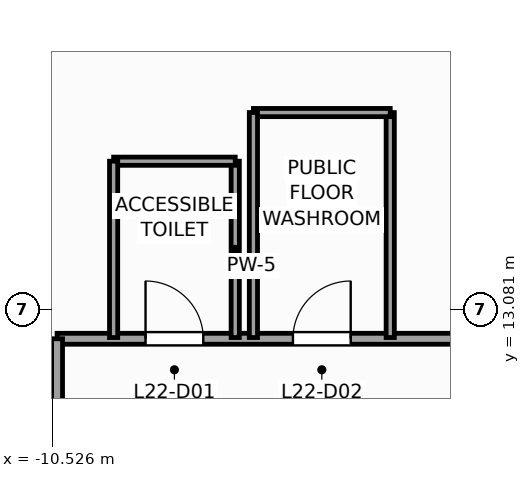
"""IFC4 building model, lengths in metres.
Left out: names, types, materials, properties, quantities, classifications, styles, units other than length and angle.
Written with IfcOpenShell. Run it as: python <this file> out.ifc"""

import sys

from ifc_helpers import new_model, si_unit, direction, frame, frame_2d, origin, place, context, subcontext, project, spatial, rectangle, extrude, source, transform, mapped, element, fill, save


model = new_model("IFC4")
c1 = context("Model", 3, precision=1e-05, world=origin(), true_north=direction((0.0, 1.0)))
c2 = subcontext(c1, "Body", "Model", "MODEL_VIEW")
j1 = project(units=[si_unit("LENGTHUNIT", "METRE"), si_unit("PLANEANGLEUNIT", "RADIAN")], contexts=[c1])
p1 = place(None, origin())
s1 = spatial("IfcSite", under=j1, at=p1, CompositionType="ELEMENT")
p2 = place(p1, origin())
s2 = spatial("IfcBuilding", under=s1, at=p2, CompositionType="ELEMENT")
p3 = place(p2, frame((0.0, 0.0, 95.2)))
s3 = spatial("IfcBuildingStorey", under=s2, at=p3, CompositionType="ELEMENT", Elevation=95.2)
p4 = place(p3, frame((-10.45, 12.6, 0.0), z_axis=(0.0, 0.0, 1.0), x_axis=(1.0, 0.0, 0.0)))
e1 = element("IfcWall", 1, at=p4, inside=s3, PredefinedType="PARTITIONING", context=c2, shape_type="SweptSolid", body=[
    extrude(rectangle(XDim=23.05, YDim=0.18, at=frame_2d((11.525, 0.0))), origin(), (0.0, 0.0, 1.0), 3.74),
])
p5 = place(p4, frame((1.455, 0.0, 0.0)))
e2 = element("IfcOpeningElement", 2, at=p5, cuts=e1, PredefinedType="OPENING", context=c2, shape_type="SweptSolid", body=[
    extrude(rectangle(XDim=0.95, YDim=2.1, at=frame_2d((0.475, 1.05))), frame((0.0, 0.1, 0.0), z_axis=(0.0, -1.0, 0.0), x_axis=(1.0, 0.0, 0.0)), (0.0, 0.0, 1.0), 0.2),
])
p6 = place(p4, frame((3.879, 0.0, 0.0)))
e3 = element("IfcOpeningElement", 3, at=p6, cuts=e1, PredefinedType="OPENING", context=c2, shape_type="SweptSolid", body=[
    extrude(rectangle(XDim=0.95, YDim=2.1, at=frame_2d((0.475, 1.05))), frame((0.0, 0.1, 0.0), z_axis=(0.0, -1.0, 0.0), x_axis=(1.0, 0.0, 0.0)), (0.0, 0.0, 1.0), 0.2),
])
p7 = place(p4, frame((14.436, 0.0, 0.0)))
e4 = element("IfcOpeningElement", 4, at=p7, cuts=e1, PredefinedType="OPENING", context=c2, shape_type="SweptSolid", body=[
    extrude(rectangle(XDim=1.1, YDim=2.2, at=frame_2d((0.55, 1.1))), frame((0.0, 0.1, 0.0), z_axis=(0.0, -1.0, 0.0), x_axis=(1.0, 0.0, 0.0)), (0.0, 0.0, 1.0), 0.2),
])
p8 = place(p3, frame((-10.45, -1.05, 0.0), z_axis=(0.0, 0.0, 1.0), x_axis=(0.0, 1.0, 0.0)))
e5 = element("IfcWall", 5, at=p8, inside=s3, PredefinedType="PARTITIONING", context=c2, shape_type="SweptSolid", body=[
    extrude(rectangle(XDim=13.65, YDim=0.18, at=frame_2d((6.825, 0.0))), origin(), (0.0, 0.0, 1.0), 3.74),
])
p9 = place(p3, frame((-7.52, 12.62, 0.0), z_axis=(0.0, 0.0, 1.0), x_axis=(0.0, 1.0, 0.0)))
e6 = element("IfcWall", 6, at=p9, inside=s3, PredefinedType="PARTITIONING", context=c2, shape_type="SweptSolid", body=[
    extrude(rectangle(XDim=2.9, YDim=0.135, at=frame_2d((1.45, 0.0))), origin(), (0.0, 0.0, 1.0), 3.41),
])
p10 = place(p3, frame((-9.52, 15.52, 0.0), z_axis=(0.0, 0.0, 1.0), x_axis=(1.0, 0.0, 0.0)))
e7 = element("IfcWall", 7, at=p10, inside=s3, PredefinedType="PARTITIONING", context=c2, shape_type="SweptSolid", body=[
    extrude(rectangle(XDim=2.0, YDim=0.135, at=frame_2d((1.0, 0.0))), origin(), (0.0, 0.0, 1.0), 3.74),
])
p11 = place(p3, frame((-9.52, 12.62, 0.0), z_axis=(0.0, 0.0, 1.0), x_axis=(0.0, 1.0, 0.0)))
e8 = element("IfcWall", 8, at=p11, inside=s3, PredefinedType="PARTITIONING", context=c2, shape_type="SweptSolid", body=[
    extrude(rectangle(XDim=2.9, YDim=0.135, at=frame_2d((1.45, 0.0))), origin(), (0.0, 0.0, 1.0), 3.74),
])
p12 = place(p3, frame((-4.971, 12.62, 0.0), z_axis=(0.0, 0.0, 1.0), x_axis=(0.0, 1.0, 0.0)))
e9 = element("IfcWall", 9, at=p12, inside=s3, PredefinedType="PARTITIONING", context=c2, shape_type="SweptSolid", body=[
    extrude(rectangle(XDim=3.7, YDim=0.135, at=frame_2d((1.85, 0.0))), origin(), (0.0, 0.0, 1.0), 3.74),
])
p13 = place(p3, frame((-7.221, 16.32, 0.0), z_axis=(0.0, 0.0, 1.0), x_axis=(1.0, 0.0, 0.0)))
e10 = element("IfcWall", 10, at=p13, inside=s3, PredefinedType="PARTITIONING", context=c2, shape_type="SweptSolid", body=[
    extrude(rectangle(XDim=2.25, YDim=0.135, at=frame_2d((1.125, 0.0))), origin(), (0.0, 0.0, 1.0), 3.74),
])
p14 = place(p3, frame((-7.221, 12.62, 0.0), z_axis=(0.0, 0.0, 1.0), x_axis=(0.0, 1.0, 0.0)))
e11 = element("IfcWall", 11, at=p14, inside=s3, PredefinedType="PARTITIONING", context=c2, shape_type="SweptSolid", body=[
    extrude(rectangle(XDim=3.7, YDim=0.135, at=frame_2d((1.85, 0.0))), origin(), (0.0, 0.0, 1.0), 3.41),
])
m1 = source(origin(), c2, "Body", "SweptSolid", [
    extrude(rectangle(XDim=0.95, YDim=2.1, at=frame_2d((0.475, 1.05))), frame((0.0, 0.025, 0.0), z_axis=(0.0, -1.0, 0.0), x_axis=(1.0, 0.0, 0.0)), (0.0, 0.0, 1.0), 0.05),
])
p15 = place(p5, origin())
e12 = element("IfcDoor", 12, at=p15, inside=s3, OperationType="SINGLE_SWING_LEFT", PredefinedType="DOOR", context=c2, shape_type="MappedRepresentation", body=[
    mapped(m1, transform((0.0, 0.0, 0.0), scale=1.0)),
])
fill(e2, e12)
p16 = place(p6, origin())
e13 = element("IfcDoor", 13, at=p16, inside=s3, OperationType="SINGLE_SWING_RIGHT", PredefinedType="DOOR", context=c2, shape_type="MappedRepresentation", body=[
    mapped(m1, transform((0.0, 0.0, 0.0), scale=1.0)),
])
fill(e3, e13)
save(model, sys.argv[1])
